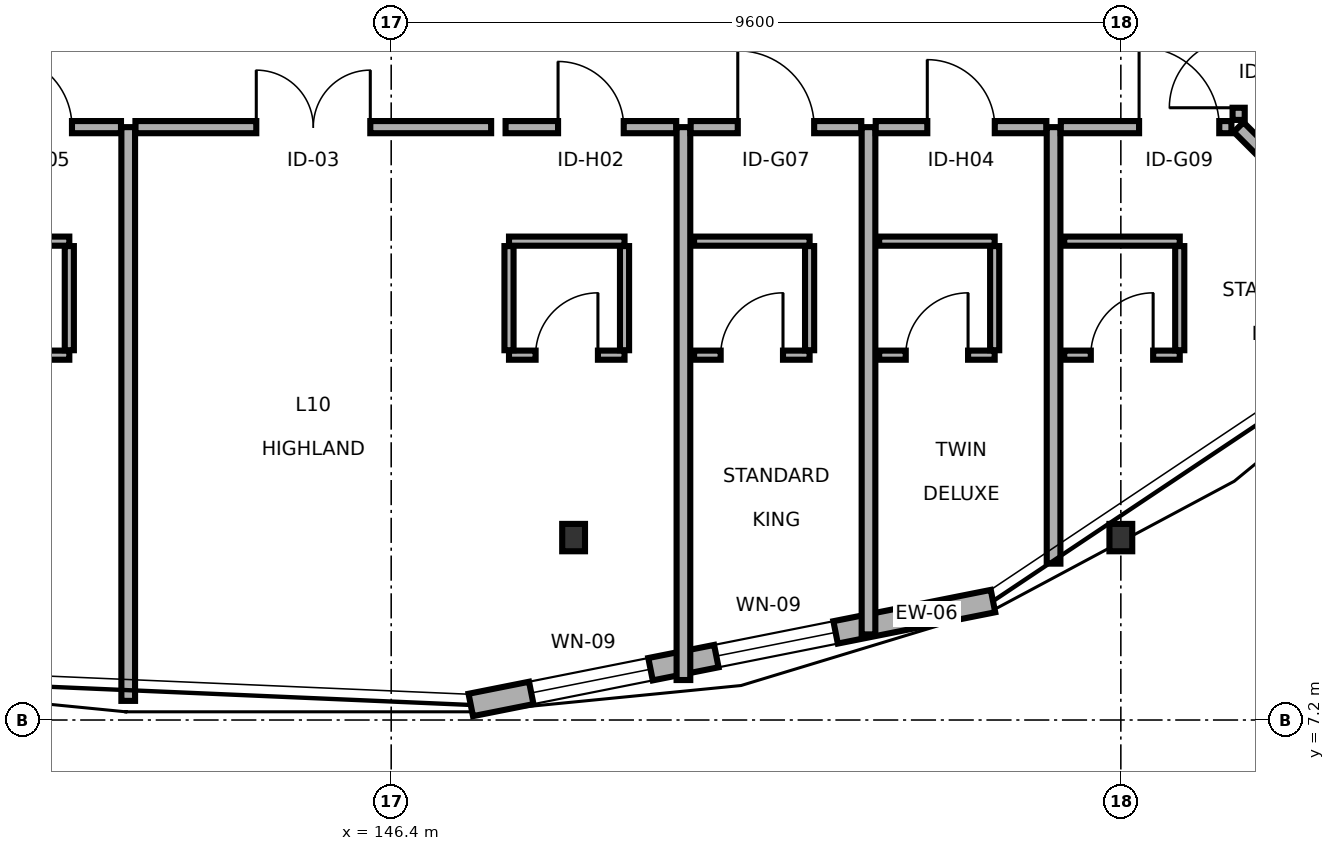
"""IFC4 building model, lengths in metres.
Left out: names, types, materials, properties, quantities, classifications, styles, units other than length and angle.
Written with IfcOpenShell. Run it as: python <this file> out.ifc"""

import sys

from ifc_helpers import new_model, si_unit, direction, frame, frame_2d, origin, origin_2d, place, context, subcontext, project, spatial, rectangle, i_section, extrude, element, fill, save


model = new_model("IFC4")
c1 = context("Model", 3, precision=1e-05, world=origin(), true_north=direction((0.0, 1.0)))
c2 = subcontext(c1, "Body", "Model", "MODEL_VIEW")
j1 = project(units=[si_unit("LENGTHUNIT", "METRE"), si_unit("PLANEANGLEUNIT", "RADIAN")], contexts=[c1])
p1 = place(None, origin())
s1 = spatial("IfcSite", under=j1, at=p1, CompositionType="ELEMENT")
p2 = place(p1, origin())
s2 = spatial("IfcBuilding", under=s1, at=p2, CompositionType="ELEMENT")
p3 = place(p2, frame((0.0, 0.0, 35.1)))
s3 = spatial("IfcBuildingStorey", under=s2, at=p3, CompositionType="ELEMENT", Elevation=35.1)
for number, where, z_axis, x_axis in (
    (1, (148.8, 9.6, 0.0), (0.0, 0.0, 1.0), (1.0, 0.0, 0.0)),
    (2, (156.0, 9.6, 0.0), (0.0, 0.0, 1.0), (1.0, 0.0, 0.0)),
):
    element("IfcColumn", number, at=place(p3, frame(where, z_axis=z_axis, x_axis=x_axis)), inside=s3, PredefinedType="COLUMN", context=c2, shape_type="SweptSolid", body=[
        extrude(i_section(OverallWidth=0.3, OverallDepth=0.36, WebThickness=0.012, FlangeThickness=0.022, FilletRadius=0.027, at=origin_2d()), origin(), (0.0, 0.0, 1.0), 3.4),
    ])
p4 = place(p3, frame((147.447, 7.398, 0.0), z_axis=(0.0, 0.0, 1.0), x_axis=(0.980786545094, 0.19508396388, 0.0)))
e3 = element("IfcWall", 3, at=p4, inside=s3, PredefinedType="SOLIDWALL", context=c2, shape_type="SweptSolid", body=[
    extrude(rectangle(XDim=7.006, YDim=0.3, at=frame_2d((3.503, 0.0))), origin(), (0.0, 0.0, 1.0), 2.85),
])
p5 = place(p4, frame((0.812, 0.0, 0.8)))
e4 = element("IfcOpeningElement", 4, at=p5, cuts=e3, PredefinedType="OPENING", context=c2, shape_type="SweptSolid", body=[
    extrude(rectangle(XDim=1.6, YDim=1.5, at=frame_2d((0.8, 0.75))), frame((0.0, 0.16, 0.0), z_axis=(0.0, -1.0, 0.0), x_axis=(1.0, 0.0, 0.0)), (0.0, 0.0, 1.0), 0.32),
])
p6 = place(p4, frame((3.294, 0.0, 0.8)))
e5 = element("IfcOpeningElement", 5, at=p6, cuts=e3, PredefinedType="OPENING", context=c2, shape_type="SweptSolid", body=[
    extrude(rectangle(XDim=1.6, YDim=1.5, at=frame_2d((0.8, 0.75))), frame((0.0, 0.16, 0.0), z_axis=(0.0, -1.0, 0.0), x_axis=(1.0, 0.0, 0.0)), (0.0, 0.0, 1.0), 0.32),
])
p7 = place(p3, frame((143.035, 15.0, 0.0), z_axis=(0.0, 0.0, 1.0), x_axis=(1.0, 0.0, 0.0)))
e6 = element("IfcWall", 6, at=p7, inside=s3, PredefinedType="PARTITIONING", context=c2, shape_type="SweptSolid", body=[
    extrude(rectangle(XDim=4.68, YDim=0.16, at=frame_2d((2.34, 0.0))), origin(), (0.0, 0.0, 1.0), 3.165),
])
p8 = place(p7, frame((1.59, 0.0, 0.0)))
e7 = element("IfcOpeningElement", 7, at=p8, cuts=e6, PredefinedType="OPENING", context=c2, shape_type="SweptSolid", body=[
    extrude(rectangle(XDim=1.5, YDim=2.25, at=frame_2d((0.75, 1.125))), frame((0.0, 0.09, 0.0), z_axis=(0.0, -1.0, 0.0), x_axis=(1.0, 0.0, 0.0)), (0.0, 0.0, 1.0), 0.18),
])
p9 = place(p3, frame((140.6, 15.0, 0.0), z_axis=(0.0, 0.0, 1.0), x_axis=(1.0, 0.0, 0.0)))
e8 = element("IfcWall", 8, at=p9, inside=s3, PredefinedType="PARTITIONING", context=c2, shape_type="SweptSolid", body=[
    extrude(rectangle(XDim=2.245, YDim=0.16, at=frame_2d((1.123, 0.0))), origin(), (0.0, 0.0, 1.0), 2.75),
])
p10 = place(p9, frame((0.645, 0.0, 0.0)))
e9 = element("IfcOpeningElement", 9, at=p10, cuts=e8, PredefinedType="OPENING", context=c2, shape_type="SweptSolid", body=[
    extrude(rectangle(XDim=0.955, YDim=2.05, at=frame_2d((0.478, 1.025))), frame((0.0, 0.09, 0.0), z_axis=(0.0, -1.0, 0.0), x_axis=(1.0, 0.0, 0.0)), (0.0, 0.0, 1.0), 0.18),
])
p11 = place(p3, frame((140.645, 12.0, 0.0), z_axis=(0.0, 0.0, 1.0), x_axis=(1.0, 0.0, 0.0)))
e10 = element("IfcWall", 10, at=p11, inside=s3, PredefinedType="PARTITIONING", context=c2, shape_type="SweptSolid", body=[
    extrude(rectangle(XDim=1.52, YDim=0.12, at=frame_2d((0.76, 0.0))), origin(), (0.0, 0.0, 1.0), 2.75),
])
p12 = place(p11, frame((0.35, 0.0, 0.0)))
e11 = element("IfcOpeningElement", 11, at=p12, cuts=e10, PredefinedType="OPENING", context=c2, shape_type="SweptSolid", body=[
    extrude(rectangle(XDim=0.82, YDim=2.08, at=frame_2d((0.41, 1.04))), frame((0.0, 0.07, 0.0), z_axis=(0.0, -1.0, 0.0), x_axis=(1.0, 0.0, 0.0)), (0.0, 0.0, 1.0), 0.14),
])
p13 = place(p3, frame((140.645, 13.5, 0.0), z_axis=(0.0, 0.0, 1.0), x_axis=(1.0, 0.0, 0.0)))
e12 = element("IfcWall", 12, at=p13, inside=s3, PredefinedType="PARTITIONING", context=c2, shape_type="SweptSolid", body=[
    extrude(rectangle(XDim=1.52, YDim=0.12, at=frame_2d((0.76, 0.0))), origin(), (0.0, 0.0, 1.0), 2.75),
])
p14 = place(p3, frame((142.165, 12.065, 0.0), z_axis=(0.0, 0.0, 1.0), x_axis=(0.0, 1.0, 0.0)))
e13 = element("IfcWall", 13, at=p14, inside=s3, PredefinedType="PARTITIONING", context=c2, shape_type="SweptSolid", body=[
    extrude(rectangle(XDim=1.37, YDim=0.12, at=frame_2d((0.685, 0.0))), origin(), (0.0, 0.0, 1.0), 3.165),
])
p15 = place(p3, frame((142.94, 7.452, 0.0), z_axis=(0.0, 0.0, 1.0), x_axis=(0.0, 1.0, 0.0)))
e14 = element("IfcWall", 14, at=p15, inside=s3, PredefinedType="PARTITIONING", context=c2, shape_type="SweptSolid", body=[
    extrude(rectangle(XDim=7.548, YDim=0.18, at=frame_2d((3.774, 0.0))), origin(), (0.0, 0.0, 1.0), 2.65),
])
p16 = place(p3, frame((147.905, 15.0, 0.0), z_axis=(0.0, 0.0, 1.0), x_axis=(1.0, 0.0, 0.0)))
e15 = element("IfcWall", 15, at=p16, inside=s3, PredefinedType="PARTITIONING", context=c2, shape_type="SweptSolid", body=[
    extrude(rectangle(XDim=2.245, YDim=0.16, at=frame_2d((1.123, 0.0))), origin(), (0.0, 0.0, 1.0), 2.75),
])
p17 = place(p16, frame((0.69, 0.0, 0.0)))
e16 = element("IfcOpeningElement", 16, at=p17, cuts=e15, PredefinedType="OPENING", context=c2, shape_type="SweptSolid", body=[
    extrude(rectangle(XDim=0.864, YDim=2.13, at=frame_2d((0.432, 1.065))), frame((0.0, 0.09, 0.0), z_axis=(0.0, -1.0, 0.0), x_axis=(1.0, 0.0, 0.0)), (0.0, 0.0, 1.0), 0.18),
])
p18 = place(p3, frame((147.95, 12.0, 0.0), z_axis=(0.0, 0.0, 1.0), x_axis=(1.0, 0.0, 0.0)))
e17 = element("IfcWall", 17, at=p18, inside=s3, PredefinedType="PARTITIONING", context=c2, shape_type="SweptSolid", body=[
    extrude(rectangle(XDim=1.52, YDim=0.12, at=frame_2d((0.76, 0.0))), origin(), (0.0, 0.0, 1.0), 2.75),
])
p19 = place(p18, frame((0.35, 0.0, 0.0)))
e18 = element("IfcOpeningElement", 18, at=p19, cuts=e17, PredefinedType="OPENING", context=c2, shape_type="SweptSolid", body=[
    extrude(rectangle(XDim=0.82, YDim=2.08, at=frame_2d((0.41, 1.04))), frame((0.0, 0.07, 0.0), z_axis=(0.0, -1.0, 0.0), x_axis=(1.0, 0.0, 0.0)), (0.0, 0.0, 1.0), 0.14),
])
p20 = place(p3, frame((147.95, 13.5, 0.0), z_axis=(0.0, 0.0, 1.0), x_axis=(1.0, 0.0, 0.0)))
e19 = element("IfcWall", 19, at=p20, inside=s3, PredefinedType="PARTITIONING", context=c2, shape_type="SweptSolid", body=[
    extrude(rectangle(XDim=1.52, YDim=0.12, at=frame_2d((0.76, 0.0))), origin(), (0.0, 0.0, 1.0), 2.75),
])
for number, where, z_axis, x_axis in (
    (20, (147.95, 12.065, 0.0), (0.0, 0.0, 1.0), (0.0, 1.0, 0.0)),
    (21, (149.47, 12.065, 0.0), (0.0, 0.0, 1.0), (0.0, 1.0, 0.0)),
):
    element("IfcWall", number, at=place(p3, frame(where, z_axis=z_axis, x_axis=x_axis)), inside=s3, PredefinedType="PARTITIONING", context=c2, shape_type="SweptSolid", body=[
        extrude(rectangle(XDim=1.37, YDim=0.12, at=frame_2d((0.685, 0.0))), origin(), (0.0, 0.0, 1.0), 3.165),
    ])
p21 = place(p3, frame((150.245, 7.726, 0.0), z_axis=(0.0, 0.0, 1.0), x_axis=(0.0, 1.0, 0.0)))
e22 = element("IfcWall", 22, at=p21, inside=s3, PredefinedType="PARTITIONING", context=c2, shape_type="SweptSolid", body=[
    extrude(rectangle(XDim=7.274, YDim=0.18, at=frame_2d((3.637, 0.0))), origin(), (0.0, 0.0, 1.0), 2.65),
])
p22 = place(p3, frame((150.34, 15.0, 0.0), z_axis=(0.0, 0.0, 1.0), x_axis=(1.0, 0.0, 0.0)))
e23 = element("IfcWall", 23, at=p22, inside=s3, PredefinedType="PARTITIONING", context=c2, shape_type="SweptSolid", body=[
    extrude(rectangle(XDim=2.245, YDim=0.16, at=frame_2d((1.123, 0.0))), origin(), (0.0, 0.0, 1.0), 3.165),
])
p23 = place(p22, frame((0.62, 0.0, 0.0)))
e24 = element("IfcOpeningElement", 24, at=p23, cuts=e23, PredefinedType="OPENING", context=c2, shape_type="SweptSolid", body=[
    extrude(rectangle(XDim=1.005, YDim=2.05, at=frame_2d((0.502, 1.025))), frame((0.0, 0.09, 0.0), z_axis=(0.0, -1.0, 0.0), x_axis=(1.0, 0.0, 0.0)), (0.0, 0.0, 1.0), 0.18),
])
p24 = place(p3, frame((150.385, 12.0, 0.0), z_axis=(0.0, 0.0, 1.0), x_axis=(1.0, 0.0, 0.0)))
e25 = element("IfcWall", 25, at=p24, inside=s3, PredefinedType="PARTITIONING", context=c2, shape_type="SweptSolid", body=[
    extrude(rectangle(XDim=1.52, YDim=0.12, at=frame_2d((0.76, 0.0))), origin(), (0.0, 0.0, 1.0), 3.165),
])
p25 = place(p24, frame((0.35, 0.0, 0.0)))
e26 = element("IfcOpeningElement", 26, at=p25, cuts=e25, PredefinedType="OPENING", context=c2, shape_type="SweptSolid", body=[
    extrude(rectangle(XDim=0.82, YDim=2.08, at=frame_2d((0.41, 1.04))), frame((0.0, 0.07, 0.0), z_axis=(0.0, -1.0, 0.0), x_axis=(1.0, 0.0, 0.0)), (0.0, 0.0, 1.0), 0.14),
])
p26 = place(p3, frame((150.385, 13.5, 0.0), z_axis=(0.0, 0.0, 1.0), x_axis=(1.0, 0.0, 0.0)))
e27 = element("IfcWall", 27, at=p26, inside=s3, PredefinedType="PARTITIONING", context=c2, shape_type="SweptSolid", body=[
    extrude(rectangle(XDim=1.52, YDim=0.12, at=frame_2d((0.76, 0.0))), origin(), (0.0, 0.0, 1.0), 3.165),
])
p27 = place(p3, frame((151.905, 12.065, 0.0), z_axis=(0.0, 0.0, 1.0), x_axis=(0.0, 1.0, 0.0)))
e28 = element("IfcWall", 28, at=p27, inside=s3, PredefinedType="PARTITIONING", context=c2, shape_type="SweptSolid", body=[
    extrude(rectangle(XDim=1.37, YDim=0.12, at=frame_2d((0.685, 0.0))), origin(), (0.0, 0.0, 1.0), 3.165),
])
p28 = place(p3, frame((152.68, 8.326, 0.0), z_axis=(0.0, 0.0, 1.0), x_axis=(0.0, 1.0, 0.0)))
e29 = element("IfcWall", 29, at=p28, inside=s3, PredefinedType="PARTITIONING", context=c2, shape_type="SweptSolid", body=[
    extrude(rectangle(XDim=6.674, YDim=0.18, at=frame_2d((3.337, 0.0))), origin(), (0.0, 0.0, 1.0), 2.65),
])
p29 = place(p3, frame((152.775, 15.0, 0.0), z_axis=(0.0, 0.0, 1.0), x_axis=(1.0, 0.0, 0.0)))
e30 = element("IfcWall", 30, at=p29, inside=s3, PredefinedType="PARTITIONING", context=c2, shape_type="SweptSolid", body=[
    extrude(rectangle(XDim=2.245, YDim=0.16, at=frame_2d((1.123, 0.0))), origin(), (0.0, 0.0, 1.0), 3.165),
])
p30 = place(p29, frame((0.678, 0.0, 0.0)))
e31 = element("IfcOpeningElement", 31, at=p30, cuts=e30, PredefinedType="OPENING", context=c2, shape_type="SweptSolid", body=[
    extrude(rectangle(XDim=0.888, YDim=2.07, at=frame_2d((0.444, 1.035))), frame((0.0, 0.09, 0.0), z_axis=(0.0, -1.0, 0.0), x_axis=(1.0, 0.0, 0.0)), (0.0, 0.0, 1.0), 0.18),
])
p31 = place(p3, frame((152.82, 12.0, 0.0), z_axis=(0.0, 0.0, 1.0), x_axis=(1.0, 0.0, 0.0)))
e32 = element("IfcWall", 32, at=p31, inside=s3, PredefinedType="PARTITIONING", context=c2, shape_type="SweptSolid", body=[
    extrude(rectangle(XDim=1.52, YDim=0.12, at=frame_2d((0.76, 0.0))), origin(), (0.0, 0.0, 1.0), 3.165),
])
p32 = place(p31, frame((0.35, 0.0, 0.0)))
e33 = element("IfcOpeningElement", 33, at=p32, cuts=e32, PredefinedType="OPENING", context=c2, shape_type="SweptSolid", body=[
    extrude(rectangle(XDim=0.82, YDim=2.08, at=frame_2d((0.41, 1.04))), frame((0.0, 0.07, 0.0), z_axis=(0.0, -1.0, 0.0), x_axis=(1.0, 0.0, 0.0)), (0.0, 0.0, 1.0), 0.14),
])
p33 = place(p3, frame((152.82, 13.5, 0.0), z_axis=(0.0, 0.0, 1.0), x_axis=(1.0, 0.0, 0.0)))
e34 = element("IfcWall", 34, at=p33, inside=s3, PredefinedType="PARTITIONING", context=c2, shape_type="SweptSolid", body=[
    extrude(rectangle(XDim=1.52, YDim=0.12, at=frame_2d((0.76, 0.0))), origin(), (0.0, 0.0, 1.0), 3.165),
])
p34 = place(p3, frame((154.34, 12.065, 0.0), z_axis=(0.0, 0.0, 1.0), x_axis=(0.0, 1.0, 0.0)))
e35 = element("IfcWall", 35, at=p34, inside=s3, PredefinedType="PARTITIONING", context=c2, shape_type="SweptSolid", body=[
    extrude(rectangle(XDim=1.37, YDim=0.12, at=frame_2d((0.685, 0.0))), origin(), (0.0, 0.0, 1.0), 3.165),
])
p35 = place(p3, frame((155.115, 9.257, 0.0), z_axis=(0.0, 0.0, 1.0), x_axis=(0.0, 1.0, 0.0)))
e36 = element("IfcWall", 36, at=p35, inside=s3, PredefinedType="PARTITIONING", context=c2, shape_type="SweptSolid", body=[
    extrude(rectangle(XDim=5.743, YDim=0.18, at=frame_2d((2.872, 0.0))), origin(), (0.0, 0.0, 1.0), 2.65),
])
p36 = place(p3, frame((155.21, 15.0, 0.0), z_axis=(0.0, 0.0, 1.0), x_axis=(1.0, 0.0, 0.0)))
e37 = element("IfcWall", 37, at=p36, inside=s3, PredefinedType="PARTITIONING", context=c2, shape_type="SweptSolid", body=[
    extrude(rectangle(XDim=2.245, YDim=0.16, at=frame_2d((1.123, 0.0))), origin(), (0.0, 0.0, 1.0), 2.75),
])
p37 = place(p36, frame((1.03, 0.0, 0.0)))
e38 = element("IfcOpeningElement", 38, at=p37, cuts=e37, PredefinedType="OPENING", context=c2, shape_type="SweptSolid", body=[
    extrude(rectangle(XDim=1.055, YDim=2.05, at=frame_2d((0.527, 1.025))), frame((0.0, 0.09, 0.0), z_axis=(0.0, -1.0, 0.0), x_axis=(1.0, 0.0, 0.0)), (0.0, 0.0, 1.0), 0.18),
])
p38 = place(p3, frame((155.255, 12.0, 0.0), z_axis=(0.0, 0.0, 1.0), x_axis=(1.0, 0.0, 0.0)))
e39 = element("IfcWall", 39, at=p38, inside=s3, PredefinedType="PARTITIONING", context=c2, shape_type="SweptSolid", body=[
    extrude(rectangle(XDim=1.52, YDim=0.12, at=frame_2d((0.76, 0.0))), origin(), (0.0, 0.0, 1.0), 2.75),
])
p39 = place(p38, frame((0.35, 0.0, 0.0)))
e40 = element("IfcOpeningElement", 40, at=p39, cuts=e39, PredefinedType="OPENING", context=c2, shape_type="SweptSolid", body=[
    extrude(rectangle(XDim=0.82, YDim=2.08, at=frame_2d((0.41, 1.04))), frame((0.0, 0.07, 0.0), z_axis=(0.0, -1.0, 0.0), x_axis=(1.0, 0.0, 0.0)), (0.0, 0.0, 1.0), 0.14),
])
p40 = place(p3, frame((155.255, 13.5, 0.0), z_axis=(0.0, 0.0, 1.0), x_axis=(1.0, 0.0, 0.0)))
e41 = element("IfcWall", 41, at=p40, inside=s3, PredefinedType="PARTITIONING", context=c2, shape_type="SweptSolid", body=[
    extrude(rectangle(XDim=1.52, YDim=0.12, at=frame_2d((0.76, 0.0))), origin(), (0.0, 0.0, 1.0), 2.75),
])
p41 = place(p3, frame((156.775, 12.065, 0.0), z_axis=(0.0, 0.0, 1.0), x_axis=(0.0, 1.0, 0.0)))
e42 = element("IfcWall", 42, at=p41, inside=s3, PredefinedType="PARTITIONING", context=c2, shape_type="SweptSolid", body=[
    extrude(rectangle(XDim=1.37, YDim=0.12, at=frame_2d((0.685, 0.0))), origin(), (0.0, 0.0, 1.0), 3.165),
])
p42 = place(p3, frame((157.55, 15.0, 0.0), z_axis=(0.0, 0.0, 1.0), x_axis=(0.707106781187, -0.707106781187, 0.0)))
e43 = element("IfcWall", 43, at=p42, inside=s3, PredefinedType="PARTITIONING", context=c2, shape_type="SweptSolid", body=[
    extrude(rectangle(XDim=3.413, YDim=0.18, at=frame_2d((1.706, 0.0))), origin(), (0.0, 0.0, 1.0), 2.65),
])
p43 = place(p3, frame((157.55, 15.095, 0.0), z_axis=(0.0, 0.0, 1.0), x_axis=(0.0, 1.0, 0.0)))
e44 = element("IfcWall", 44, at=p43, inside=s3, PredefinedType="PARTITIONING", context=c2, shape_type="SweptSolid", body=[
    extrude(rectangle(XDim=2.33, YDim=0.16, at=frame_2d((1.165, 0.0))), origin(), (0.0, 0.0, 1.0), 2.75),
])
p44 = place(p43, frame((0.16, 0.0, 0.0)))
e45 = element("IfcOpeningElement", 45, at=p44, cuts=e44, PredefinedType="OPENING", context=c2, shape_type="SweptSolid", body=[
    extrude(rectangle(XDim=0.912, YDim=2.13, at=frame_2d((0.456, 1.065))), frame((0.0, 0.09, 0.0), z_axis=(0.0, -1.0, 0.0), x_axis=(1.0, 0.0, 0.0)), (0.0, 0.0, 1.0), 0.18),
])
p45 = place(p5, origin())
e46 = element("IfcWindow", 46, at=p45, inside=s3, PartitioningType="SINGLE_PANEL", PredefinedType="WINDOW", context=c2, shape_type="SweptSolid", body=[
    extrude(rectangle(XDim=1.6, YDim=1.5, at=frame_2d((0.8, 0.75))), frame((0.0, 0.03, 0.0), z_axis=(0.0, -1.0, 0.0), x_axis=(1.0, 0.0, 0.0)), (0.0, 0.0, 1.0), 0.06),
])
fill(e4, e46)
p46 = place(p6, origin())
e47 = element("IfcWindow", 47, at=p46, inside=s3, PartitioningType="SINGLE_PANEL", PredefinedType="WINDOW", context=c2, shape_type="SweptSolid", body=[
    extrude(rectangle(XDim=1.6, YDim=1.5, at=frame_2d((0.8, 0.75))), frame((0.0, 0.03, 0.0), z_axis=(0.0, -1.0, 0.0), x_axis=(1.0, 0.0, 0.0)), (0.0, 0.0, 1.0), 0.06),
])
fill(e5, e47)
p47 = place(p8, origin())
e48 = element("IfcDoor", 48, at=p47, inside=s3, OperationType="DOUBLE_DOOR_SINGLE_SWING", PredefinedType="DOOR", context=c2, shape_type="SweptSolid", body=[
    extrude(rectangle(XDim=1.5, YDim=2.25, at=frame_2d((0.75, 1.125))), frame((0.0, 0.025, 0.0), z_axis=(0.0, -1.0, 0.0), x_axis=(1.0, 0.0, 0.0)), (0.0, 0.0, 1.0), 0.05),
])
fill(e7, e48)
p48 = place(p10, origin())
e49 = element("IfcDoor", 49, at=p48, inside=s3, OperationType="SINGLE_SWING_LEFT", PredefinedType="DOOR", context=c2, shape_type="SweptSolid", body=[
    extrude(rectangle(XDim=0.955, YDim=2.05, at=frame_2d((0.478, 1.025))), frame((0.0, 0.025, 0.0), z_axis=(0.0, -1.0, 0.0), x_axis=(1.0, 0.0, 0.0)), (0.0, 0.0, 1.0), 0.05),
])
fill(e9, e49)
p49 = place(p17, origin())
e50 = element("IfcDoor", 50, at=p49, inside=s3, OperationType="SINGLE_SWING_LEFT", PredefinedType="DOOR", context=c2, shape_type="SweptSolid", body=[
    extrude(rectangle(XDim=0.864, YDim=2.13, at=frame_2d((0.432, 1.065))), frame((0.0, 0.025, 0.0), z_axis=(0.0, -1.0, 0.0), x_axis=(1.0, 0.0, 0.0)), (0.0, 0.0, 1.0), 0.05),
])
fill(e16, e50)
p50 = place(p19, origin())
e51 = element("IfcDoor", 51, at=p50, inside=s3, OperationType="SINGLE_SWING_RIGHT", PredefinedType="DOOR", context=c2, shape_type="SweptSolid", body=[
    extrude(rectangle(XDim=0.82, YDim=2.08, at=frame_2d((0.41, 1.04))), frame((0.0, 0.025, 0.0), z_axis=(0.0, -1.0, 0.0), x_axis=(1.0, 0.0, 0.0)), (0.0, 0.0, 1.0), 0.05),
])
fill(e18, e51)
p51 = place(p23, origin())
e52 = element("IfcDoor", 52, at=p51, inside=s3, OperationType="SINGLE_SWING_LEFT", PredefinedType="DOOR", context=c2, shape_type="SweptSolid", body=[
    extrude(rectangle(XDim=1.005, YDim=2.05, at=frame_2d((0.502, 1.025))), frame((0.0, 0.025, 0.0), z_axis=(0.0, -1.0, 0.0), x_axis=(1.0, 0.0, 0.0)), (0.0, 0.0, 1.0), 0.05),
])
fill(e24, e52)
p52 = place(p25, origin())
e53 = element("IfcDoor", 53, at=p52, inside=s3, OperationType="SINGLE_SWING_RIGHT", PredefinedType="DOOR", context=c2, shape_type="SweptSolid", body=[
    extrude(rectangle(XDim=0.82, YDim=2.08, at=frame_2d((0.41, 1.04))), frame((0.0, 0.025, 0.0), z_axis=(0.0, -1.0, 0.0), x_axis=(1.0, 0.0, 0.0)), (0.0, 0.0, 1.0), 0.05),
])
fill(e26, e53)
p53 = place(p30, origin())
e54 = element("IfcDoor", 54, at=p53, inside=s3, OperationType="SINGLE_SWING_LEFT", PredefinedType="DOOR", context=c2, shape_type="SweptSolid", body=[
    extrude(rectangle(XDim=0.888, YDim=2.07, at=frame_2d((0.444, 1.035))), frame((0.0, 0.025, 0.0), z_axis=(0.0, -1.0, 0.0), x_axis=(1.0, 0.0, 0.0)), (0.0, 0.0, 1.0), 0.05),
])
fill(e31, e54)
p54 = place(p32, origin())
e55 = element("IfcDoor", 55, at=p54, inside=s3, OperationType="SINGLE_SWING_RIGHT", PredefinedType="DOOR", context=c2, shape_type="SweptSolid", body=[
    extrude(rectangle(XDim=0.82, YDim=2.08, at=frame_2d((0.41, 1.04))), frame((0.0, 0.025, 0.0), z_axis=(0.0, -1.0, 0.0), x_axis=(1.0, 0.0, 0.0)), (0.0, 0.0, 1.0), 0.05),
])
fill(e33, e55)
p55 = place(p37, origin())
e56 = element("IfcDoor", 56, at=p55, inside=s3, OperationType="SINGLE_SWING_LEFT", PredefinedType="DOOR", context=c2, shape_type="SweptSolid", body=[
    extrude(rectangle(XDim=1.055, YDim=2.05, at=frame_2d((0.527, 1.025))), frame((0.0, 0.025, 0.0), z_axis=(0.0, -1.0, 0.0), x_axis=(1.0, 0.0, 0.0)), (0.0, 0.0, 1.0), 0.05),
])
fill(e38, e56)
p56 = place(p39, origin())
e57 = element("IfcDoor", 57, at=p56, inside=s3, OperationType="SINGLE_SWING_RIGHT", PredefinedType="DOOR", context=c2, shape_type="SweptSolid", body=[
    extrude(rectangle(XDim=0.82, YDim=2.08, at=frame_2d((0.41, 1.04))), frame((0.0, 0.025, 0.0), z_axis=(0.0, -1.0, 0.0), x_axis=(1.0, 0.0, 0.0)), (0.0, 0.0, 1.0), 0.05),
])
fill(e40, e57)
p57 = place(p44, origin())
e58 = element("IfcDoor", 58, at=p57, inside=s3, OperationType="SINGLE_SWING_LEFT", PredefinedType="DOOR", context=c2, shape_type="SweptSolid", body=[
    extrude(rectangle(XDim=0.912, YDim=2.13, at=frame_2d((0.456, 1.065))), frame((0.0, 0.025, 0.0), z_axis=(0.0, -1.0, 0.0), x_axis=(1.0, 0.0, 0.0)), (0.0, 0.0, 1.0), 0.05),
])
fill(e45, e58)
save(model, sys.argv[1])
